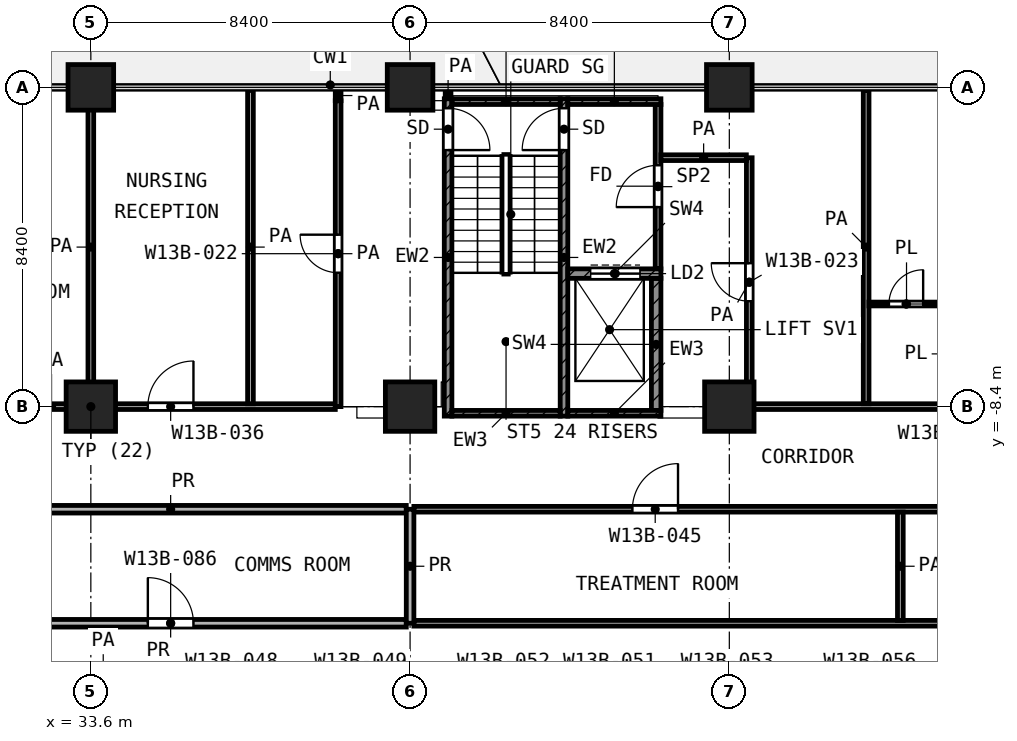
"""IFC4 building model, lengths in metres.
Left out: names, types, materials, properties, quantities, classifications, styles, units other than length and angle.
Written with IfcOpenShell. Run it as: python <this file> out.ifc"""

import sys

from ifc_helpers import new_model, si_unit, direction, frame, frame_2d, origin, origin_2d, place, context, subcontext, project, spatial, rectangle, extrude, element, fill, save


model = new_model("IFC4")
c1 = context("Model", 3, precision=1e-05, world=origin(), true_north=direction((0.0, 1.0)))
c2 = subcontext(c1, "Body", "Model", "MODEL_VIEW")
j1 = project(units=[si_unit("LENGTHUNIT", "METRE"), si_unit("PLANEANGLEUNIT", "RADIAN")], contexts=[c1])
p1 = place(None, origin())
s1 = spatial("IfcSite", under=j1, at=p1, CompositionType="ELEMENT")
p2 = place(p1, origin())
s2 = spatial("IfcBuilding", under=s1, at=p2, CompositionType="ELEMENT")
p3 = place(p2, frame((0.0, 0.0, 89.6)))
s3 = spatial("IfcBuildingStorey", under=s2, at=p3, CompositionType="ELEMENT", Elevation=89.6)
for number, where, z_axis, x_axis in (
    (1, (33.6, 0.0, 0.0), (0.0, 0.0, 1.0), (1.0, 0.0, 0.0)),
    (2, (42.0, 0.0, 0.0), (0.0, 0.0, 1.0), (1.0, 0.0, 0.0)),
    (3, (50.4, 0.0, 0.0), (0.0, 0.0, 1.0), (1.0, 0.0, 0.0)),
):
    element("IfcColumn", number, at=place(p3, frame(where, z_axis=z_axis, x_axis=x_axis)), inside=s3, PredefinedType="COLUMN", context=c2, shape_type="SweptSolid", body=[
        extrude(rectangle(XDim=1.2, YDim=1.2, at=origin_2d()), origin(), (0.0, 0.0, 1.0), 4.2),
    ])
for number, where, z_axis, x_axis in (
    (4, (33.6, -8.4, 0.0), (0.0, 0.0, 1.0), (1.0, 0.0, 0.0)),
    (5, (42.0, -8.4, 0.0), (0.0, 0.0, 1.0), (1.0, 0.0, 0.0)),
    (6, (50.4, -8.4, 0.0), (0.0, 0.0, 1.0), (1.0, 0.0, 0.0)),
):
    element("IfcColumn", number, at=place(p3, frame(where, z_axis=z_axis, x_axis=x_axis)), inside=s3, PredefinedType="COLUMN", context=c2, shape_type="SweptSolid", body=[
        extrude(rectangle(XDim=1.3, YDim=1.3, at=origin_2d()), origin(), (0.0, 0.0, 1.0), 4.2),
    ])
p4 = place(p3, frame((43.0, -8.65, 0.0), z_axis=(0.0, 0.0, 1.0), x_axis=(0.0, 1.0, 0.0)))
e7 = element("IfcWall", 7, at=p4, inside=s3, PredefinedType="SHEAR", context=c2, shape_type="SweptSolid", body=[
    extrude(rectangle(XDim=8.35, YDim=0.2, at=frame_2d((4.175, 0.0))), origin(), (0.0, 0.0, 1.0), 3.7),
])
p5 = place(p4, frame((7.0, 0.0, 0.0)))
e8 = element("IfcOpeningElement", 8, at=p5, cuts=e7, PredefinedType="OPENING", context=c2, shape_type="SweptSolid", body=[
    extrude(rectangle(XDim=1.1, YDim=2.1, at=frame_2d((0.55, 1.05))), frame((0.0, 0.11, 0.0), z_axis=(0.0, -1.0, 0.0), x_axis=(1.0, 0.0, 0.0)), (0.0, 0.0, 1.0), 0.22),
])
p6 = place(p3, frame((46.05, -8.65, 0.0), z_axis=(0.0, 0.0, 1.0), x_axis=(0.0, 1.0, 0.0)))
e9 = element("IfcWall", 9, at=p6, inside=s3, PredefinedType="SHEAR", context=c2, shape_type="SweptSolid", body=[
    extrude(rectangle(XDim=8.35, YDim=0.2, at=frame_2d((4.175, 0.0))), origin(), (0.0, 0.0, 1.0), 3.7),
])
p7 = place(p6, frame((7.0, 0.0, 0.0)))
e10 = element("IfcOpeningElement", 10, at=p7, cuts=e9, PredefinedType="OPENING", context=c2, shape_type="SweptSolid", body=[
    extrude(rectangle(XDim=1.1, YDim=2.1, at=frame_2d((0.55, 1.05))), frame((0.0, 0.11, 0.0), z_axis=(0.0, -1.0, 0.0), x_axis=(1.0, 0.0, 0.0)), (0.0, 0.0, 1.0), 0.22),
])
p8 = place(p3, frame((43.1, -0.375, 0.0), z_axis=(0.0, 0.0, 1.0), x_axis=(1.0, 0.0, 0.0)))
e11 = element("IfcWall", 11, at=p8, inside=s3, PredefinedType="SHEAR", context=c2, shape_type="SweptSolid", body=[
    extrude(rectangle(XDim=2.85, YDim=0.15, at=frame_2d((1.425, 0.0))), origin(), (0.0, 0.0, 1.0), 3.7),
])
p9 = place(p3, frame((46.15, -0.375, 0.0), z_axis=(0.0, 0.0, 1.0), x_axis=(1.0, 0.0, 0.0)))
e12 = element("IfcWall", 12, at=p9, inside=s3, PredefinedType="SHEAR", context=c2, shape_type="SweptSolid", body=[
    extrude(rectangle(XDim=2.45, YDim=0.15, at=frame_2d((1.225, 0.0))), origin(), (0.0, 0.0, 1.0), 3.7),
])
p10 = place(p3, frame((43.1, -8.575, 0.0), z_axis=(0.0, 0.0, 1.0), x_axis=(1.0, 0.0, 0.0)))
e13 = element("IfcWall", 13, at=p10, inside=s3, PredefinedType="SHEAR", context=c2, shape_type="SweptSolid", body=[
    extrude(rectangle(XDim=2.85, YDim=0.15, at=frame_2d((1.425, 0.0))), origin(), (0.0, 0.0, 1.0), 3.7),
])
p11 = place(p3, frame((46.15, -8.575, 0.0), z_axis=(0.0, 0.0, 1.0), x_axis=(1.0, 0.0, 0.0)))
e14 = element("IfcWall", 14, at=p11, inside=s3, PredefinedType="SHEAR", context=c2, shape_type="SweptSolid", body=[
    extrude(rectangle(XDim=2.45, YDim=0.15, at=frame_2d((1.225, 0.0))), origin(), (0.0, 0.0, 1.0), 3.7),
])
p12 = place(p3, frame((46.15, -4.9, 0.0), z_axis=(0.0, 0.0, 1.0), x_axis=(1.0, 0.0, 0.0)))
e15 = element("IfcWall", 15, at=p12, inside=s3, PredefinedType="SHEAR", context=c2, shape_type="SweptSolid", body=[
    extrude(rectangle(XDim=2.45, YDim=0.25, at=frame_2d((1.225, 0.0))), origin(), (0.0, 0.0, 1.0), 3.7),
])
p13 = place(p12, frame((0.6, 0.0, 0.0)))
e16 = element("IfcOpeningElement", 16, at=p13, cuts=e15, PredefinedType="OPENING", context=c2, shape_type="SweptSolid", body=[
    extrude(rectangle(XDim=1.3, YDim=2.1, at=frame_2d((0.65, 1.05))), frame((0.0, 0.135, 0.0), z_axis=(0.0, -1.0, 0.0), x_axis=(1.0, 0.0, 0.0)), (0.0, 0.0, 1.0), 0.27),
])
p14 = place(p3, frame((48.475, -8.5, 0.0), z_axis=(0.0, 0.0, 1.0), x_axis=(0.0, 1.0, 0.0)))
e17 = element("IfcWall", 17, at=p14, inside=s3, PredefinedType="SHEAR", context=c2, shape_type="SweptSolid", body=[
    extrude(rectangle(XDim=3.475, YDim=0.25, at=frame_2d((1.738, 0.0))), origin(), (0.0, 0.0, 1.0), 3.7),
])
p15 = place(p3, frame((48.525, -4.775, 0.0), z_axis=(0.0, 0.0, 1.0), x_axis=(0.0, 1.0, 0.0)))
e18 = element("IfcWall", 18, at=p15, inside=s3, PredefinedType="PARTITIONING", context=c2, shape_type="SweptSolid", body=[
    extrude(rectangle(XDim=4.325, YDim=0.15, at=frame_2d((2.163, 0.0))), origin(), (0.0, 0.0, 1.0), 3.7),
])
p16 = place(p15, frame((1.625, 0.0, 0.0)))
e19 = element("IfcOpeningElement", 19, at=p16, cuts=e18, PredefinedType="OPENING", context=c2, shape_type="SweptSolid", body=[
    extrude(rectangle(XDim=1.1, YDim=2.1, at=frame_2d((0.55, 1.05))), frame((0.0, 0.085, 0.0), z_axis=(0.0, -1.0, 0.0), x_axis=(1.0, 0.0, 0.0)), (0.0, 0.0, 1.0), 0.17),
])
p17 = place(p3, frame((54.075, -5.7, 0.0), z_axis=(0.0, 0.0, 1.0), x_axis=(1.0, 0.0, 0.0)))
e20 = element("IfcWall", 20, at=p17, inside=s3, PredefinedType="PARTITIONING", context=c2, shape_type="SweptSolid", body=[
    extrude(rectangle(XDim=1.975, YDim=0.1, at=frame_2d((0.988, 0.0))), origin(), (0.0, 0.0, 1.0), 3.7),
])
p18 = place(p17, frame((0.525, 0.0, 0.0)))
e21 = element("IfcOpeningElement", 21, at=p18, cuts=e20, PredefinedType="OPENING", context=c2, shape_type="SweptSolid", body=[
    extrude(rectangle(XDim=0.9, YDim=2.1, at=frame_2d((0.45, 1.05))), frame((0.0, 0.06, 0.0), z_axis=(0.0, -1.0, 0.0), x_axis=(1.0, 0.0, 0.0)), (0.0, 0.0, 1.0), 0.12),
])
p19 = place(p3, frame((42.1, -14.1, 0.0), z_axis=(0.0, 0.0, 1.0), x_axis=(1.0, 0.0, 0.0)))
e22 = element("IfcWall", 22, at=p19, inside=s3, PredefinedType="PARTITIONING", context=c2, shape_type="SweptSolid", body=[
    extrude(rectangle(XDim=34.925, YDim=0.15, at=frame_2d((17.462, 0.0))), origin(), (0.0, 0.0, 1.0), 3.7),
])
p20 = place(p19, frame((20.55, 0.0, 0.0)))
e23 = element("IfcOpeningElement", 23, at=p20, cuts=e22, PredefinedType="OPENING", context=c2, shape_type="SweptSolid", body=[
    extrude(rectangle(XDim=1.0, YDim=2.1, at=frame_2d((0.5, 1.05))), frame((0.0, 0.085, 0.0), z_axis=(0.0, -1.0, 0.0), x_axis=(1.0, 0.0, 0.0)), (0.0, 0.0, 1.0), 0.17),
])
p21 = place(p19, frame((31.65, 0.0, 0.0)))
e24 = element("IfcOpeningElement", 24, at=p21, cuts=e22, PredefinedType="OPENING", context=c2, shape_type="SweptSolid", body=[
    extrude(rectangle(XDim=1.0, YDim=2.1, at=frame_2d((0.5, 1.05))), frame((0.0, 0.085, 0.0), z_axis=(0.0, -1.0, 0.0), x_axis=(1.0, 0.0, 0.0)), (0.0, 0.0, 1.0), 0.17),
])
p22 = place(p3, frame((42.1, -11.1, 0.0), z_axis=(0.0, 0.0, 1.0), x_axis=(1.0, 0.0, 0.0)))
e25 = element("IfcWall", 25, at=p22, inside=s3, PredefinedType="PARTITIONING", context=c2, shape_type="SweptSolid", body=[
    extrude(rectangle(XDim=34.925, YDim=0.15, at=frame_2d((17.462, 0.0))), origin(), (0.0, 0.0, 1.0), 3.7),
])
p23 = place(p22, frame((5.75, 0.0, 0.0)))
e26 = element("IfcOpeningElement", 26, at=p23, cuts=e25, PredefinedType="OPENING", context=c2, shape_type="SweptSolid", body=[
    extrude(rectangle(XDim=1.2, YDim=2.1, at=frame_2d((0.6, 1.05))), frame((0.0, 0.085, 0.0), z_axis=(0.0, -1.0, 0.0), x_axis=(1.0, 0.0, 0.0)), (0.0, 0.0, 1.0), 0.17),
])
p24 = place(p3, frame((25.1, -8.4, 0.0), z_axis=(0.0, 0.0, 1.0), x_axis=(1.0, 0.0, 0.0)))
e27 = element("IfcWall", 27, at=p24, inside=s3, PredefinedType="PARTITIONING", context=c2, shape_type="SweptSolid", body=[
    extrude(rectangle(XDim=14.932, YDim=0.15, at=frame_2d((7.466, 0.0))), origin(), (0.0, 0.0, 1.0), 3.7),
])
p25 = place(p24, frame((10.0, 0.0, 0.0)))
e28 = element("IfcOpeningElement", 28, at=p25, cuts=e27, PredefinedType="OPENING", context=c2, shape_type="SweptSolid", body=[
    extrude(rectangle(XDim=1.2, YDim=2.1, at=frame_2d((0.6, 1.05))), frame((0.0, 0.085, 0.0), z_axis=(0.0, -1.0, 0.0), x_axis=(1.0, 0.0, 0.0)), (0.0, 0.0, 1.0), 0.17),
])
p26 = place(p24, frame((0.65, 0.0, 0.0)))
e29 = element("IfcOpeningElement", 29, at=p26, cuts=e27, PredefinedType="OPENING", context=c2, shape_type="SweptSolid", body=[
    extrude(rectangle(XDim=1.0, YDim=2.1, at=frame_2d((0.5, 1.05))), frame((0.0, 0.085, 0.0), z_axis=(0.0, -1.0, 0.0), x_axis=(1.0, 0.0, 0.0)), (0.0, 0.0, 1.0), 0.17),
])
p27 = place(p24, frame((4.85, 0.0, 0.0)))
e30 = element("IfcOpeningElement", 30, at=p27, cuts=e27, PredefinedType="OPENING", context=c2, shape_type="SweptSolid", body=[
    extrude(rectangle(XDim=1.0, YDim=2.1, at=frame_2d((0.5, 1.05))), frame((0.0, 0.085, 0.0), z_axis=(0.0, -1.0, 0.0), x_axis=(1.0, 0.0, 0.0)), (0.0, 0.0, 1.0), 0.17),
])
p28 = place(p3, frame((51.0, -8.4, 0.0), z_axis=(0.0, 0.0, 1.0), x_axis=(1.0, 0.0, 0.0)))
e31 = element("IfcWall", 31, at=p28, inside=s3, PredefinedType="PARTITIONING", context=c2, shape_type="SweptSolid", body=[
    extrude(rectangle(XDim=28.72, YDim=0.15, at=frame_2d((14.36, 0.0))), origin(), (0.0, 0.0, 1.0), 3.7),
])
p29 = place(p28, frame((5.7, 0.0, 0.0)))
e32 = element("IfcOpeningElement", 32, at=p29, cuts=e31, PredefinedType="OPENING", context=c2, shape_type="SweptSolid", body=[
    extrude(rectangle(XDim=1.2, YDim=2.1, at=frame_2d((0.6, 1.05))), frame((0.0, 0.085, 0.0), z_axis=(0.0, -1.0, 0.0), x_axis=(1.0, 0.0, 0.0)), (0.0, 0.0, 1.0), 0.17),
])
p30 = place(p28, frame((8.5, 0.0, 0.0)))
e33 = element("IfcOpeningElement", 33, at=p30, cuts=e31, PredefinedType="OPENING", context=c2, shape_type="SweptSolid", body=[
    extrude(rectangle(XDim=1.2, YDim=2.1, at=frame_2d((0.6, 1.05))), frame((0.0, 0.085, 0.0), z_axis=(0.0, -1.0, 0.0), x_axis=(1.0, 0.0, 0.0)), (0.0, 0.0, 1.0), 0.17),
])
p31 = place(p28, frame((10.35, 0.0, 0.0)))
e34 = element("IfcOpeningElement", 34, at=p31, cuts=e31, PredefinedType="OPENING", context=c2, shape_type="SweptSolid", body=[
    extrude(rectangle(XDim=1.2, YDim=2.1, at=frame_2d((0.6, 1.05))), frame((0.0, 0.085, 0.0), z_axis=(0.0, -1.0, 0.0), x_axis=(1.0, 0.0, 0.0)), (0.0, 0.0, 1.0), 0.17),
])
p32 = place(p28, frame((14.3, 0.0, 0.0)))
e35 = element("IfcOpeningElement", 35, at=p32, cuts=e31, PredefinedType="OPENING", context=c2, shape_type="SweptSolid", body=[
    extrude(rectangle(XDim=1.2, YDim=2.1, at=frame_2d((0.6, 1.05))), frame((0.0, 0.085, 0.0), z_axis=(0.0, -1.0, 0.0), x_axis=(1.0, 0.0, 0.0)), (0.0, 0.0, 1.0), 0.17),
])
p33 = place(p28, frame((16.9, 0.0, 0.0)))
e36 = element("IfcOpeningElement", 36, at=p33, cuts=e31, PredefinedType="OPENING", context=c2, shape_type="SweptSolid", body=[
    extrude(rectangle(XDim=1.2, YDim=2.1, at=frame_2d((0.6, 1.05))), frame((0.0, 0.085, 0.0), z_axis=(0.0, -1.0, 0.0), x_axis=(1.0, 0.0, 0.0)), (0.0, 0.0, 1.0), 0.17),
])
p34 = place(p28, frame((19.35, 0.0, 0.0)))
e37 = element("IfcOpeningElement", 37, at=p34, cuts=e31, PredefinedType="OPENING", context=c2, shape_type="SweptSolid", body=[
    extrude(rectangle(XDim=1.2, YDim=2.1, at=frame_2d((0.6, 1.05))), frame((0.0, 0.085, 0.0), z_axis=(0.0, -1.0, 0.0), x_axis=(1.0, 0.0, 0.0)), (0.0, 0.0, 1.0), 0.17),
])
p35 = place(p28, frame((25.35, 0.0, 0.0)))
e38 = element("IfcOpeningElement", 38, at=p35, cuts=e31, PredefinedType="OPENING", context=c2, shape_type="SweptSolid", body=[
    extrude(rectangle(XDim=1.5, YDim=2.1, at=frame_2d((0.75, 1.05))), frame((0.0, 0.085, 0.0), z_axis=(0.0, -1.0, 0.0), x_axis=(1.0, 0.0, 0.0)), (0.0, 0.0, 1.0), 0.17),
])
p36 = place(p3, frame((48.6, -1.85, 0.0), z_axis=(0.0, 0.0, 1.0), x_axis=(1.0, 0.0, 0.0)))
e39 = element("IfcWall", 39, at=p36, inside=s3, PredefinedType="PARTITIONING", context=c2, shape_type="SweptSolid", body=[
    extrude(rectangle(XDim=2.248, YDim=0.15, at=frame_2d((1.124, 0.0))), origin(), (0.0, 0.0, 1.0), 3.7),
])
for number, where, z_axis, x_axis in (
    (40, (33.6, -8.325, 0.0), (0.0, 0.0, 1.0), (0.0, 1.0, 0.0)),
    (41, (37.8, -8.325, 0.0), (0.0, 0.0, 1.0), (0.0, 1.0, 0.0)),
):
    element("IfcWall", number, at=place(p3, frame(where, z_axis=z_axis, x_axis=x_axis)), inside=s3, PredefinedType="PARTITIONING", context=c2, shape_type="SweptSolid", body=[
        extrude(rectangle(XDim=8.245, YDim=0.15, at=frame_2d((4.123, 0.0))), origin(), (0.0, 0.0, 1.0), 3.7),
    ])
p37 = place(p3, frame((40.107, -8.4, 0.0), z_axis=(0.0, 0.0, 1.0), x_axis=(0.0, 1.0, 0.0)))
e42 = element("IfcWall", 42, at=p37, inside=s3, PredefinedType="PARTITIONING", context=c2, shape_type="SweptSolid", body=[
    extrude(rectangle(XDim=8.048, YDim=0.15, at=frame_2d((4.024, 0.0))), origin(), (0.0, 0.0, 1.0), 3.7),
])
p38 = place(p37, frame((3.524, 0.0, 0.0)))
e43 = element("IfcOpeningElement", 43, at=p38, cuts=e42, PredefinedType="OPENING", context=c2, shape_type="SweptSolid", body=[
    extrude(rectangle(XDim=1.0, YDim=2.1, at=frame_2d((0.5, 1.05))), frame((0.0, 0.085, 0.0), z_axis=(0.0, -1.0, 0.0), x_axis=(1.0, 0.0, 0.0)), (0.0, 0.0, 1.0), 0.17),
])
p39 = place(p3, frame((40.107, -0.35, 0.0), z_axis=(0.0, 0.0, 1.0), x_axis=(0.0, 1.0, 0.0)))
e44 = element("IfcWall", 44, at=p39, inside=s3, PredefinedType="PARTITIONING", context=c2, shape_type="SweptSolid", body=[
    extrude(rectangle(XDim=0.27, YDim=0.15, at=frame_2d((0.135, 0.0))), origin(), (0.0, 0.0, 1.0), 3.7),
])
p40 = place(p3, frame((43.0, -0.27, 0.0), z_axis=(0.0, 0.0, 1.0), x_axis=(0.0, 1.0, 0.0)))
e45 = element("IfcWall", 45, at=p40, inside=s3, PredefinedType="PARTITIONING", context=c2, shape_type="SweptSolid", body=[
    extrude(rectangle(XDim=0.19, YDim=0.15, at=frame_2d((0.095, 0.0))), origin(), (0.0, 0.0, 1.0), 3.7),
])
p41 = place(p3, frame((50.925, -8.4, 0.0), z_axis=(0.0, 0.0, 1.0), x_axis=(0.0, 1.0, 0.0)))
e46 = element("IfcWall", 46, at=p41, inside=s3, PredefinedType="PARTITIONING", context=c2, shape_type="SweptSolid", body=[
    extrude(rectangle(XDim=6.548, YDim=0.15, at=frame_2d((3.274, 0.0))), origin(), (0.0, 0.0, 1.0), 3.7),
])
p42 = place(p41, frame((2.774, 0.0, 0.0)))
e47 = element("IfcOpeningElement", 47, at=p42, cuts=e46, PredefinedType="OPENING", context=c2, shape_type="SweptSolid", body=[
    extrude(rectangle(XDim=1.0, YDim=2.1, at=frame_2d((0.5, 1.05))), frame((0.0, 0.085, 0.0), z_axis=(0.0, -1.0, 0.0), x_axis=(1.0, 0.0, 0.0)), (0.0, 0.0, 1.0), 0.17),
])
p43 = place(p3, frame((54.0, -8.325, 0.0), z_axis=(0.0, 0.0, 1.0), x_axis=(0.0, 1.0, 0.0)))
e48 = element("IfcWall", 48, at=p43, inside=s3, PredefinedType="PARTITIONING", context=c2, shape_type="SweptSolid", body=[
    extrude(rectangle(XDim=8.245, YDim=0.15, at=frame_2d((4.123, 0.0))), origin(), (0.0, 0.0, 1.0), 3.7),
])
p44 = place(p3, frame((54.9, -14.025, 0.0), z_axis=(0.0, 0.0, 1.0), x_axis=(0.0, 1.0, 0.0)))
e49 = element("IfcWall", 49, at=p44, inside=s3, PredefinedType="PARTITIONING", context=c2, shape_type="SweptSolid", body=[
    extrude(rectangle(XDim=2.85, YDim=0.15, at=frame_2d((1.425, 0.0))), origin(), (0.0, 0.0, 1.0), 3.7),
])
p45 = place(p3, frame((29.5, -14.1, 0.0), z_axis=(0.0, 0.0, 1.0), x_axis=(1.0, 0.0, 0.0)))
e50 = element("IfcWall", 50, at=p45, inside=s3, PredefinedType="PARTITIONING", context=c2, shape_type="SweptSolid", body=[
    extrude(rectangle(XDim=12.4, YDim=0.2, at=frame_2d((6.2, 0.0))), origin(), (0.0, 0.0, 1.0), 3.7),
])
p46 = place(p45, frame((5.6, 0.0, 0.0)))
e51 = element("IfcOpeningElement", 51, at=p46, cuts=e50, PredefinedType="OPENING", context=c2, shape_type="SweptSolid", body=[
    extrude(rectangle(XDim=1.2, YDim=2.1, at=frame_2d((0.6, 1.05))), frame((0.0, 0.11, 0.0), z_axis=(0.0, -1.0, 0.0), x_axis=(1.0, 0.0, 0.0)), (0.0, 0.0, 1.0), 0.22),
])
p47 = place(p3, frame((29.5, -11.1, 0.0), z_axis=(0.0, 0.0, 1.0), x_axis=(1.0, 0.0, 0.0)))
e52 = element("IfcWall", 52, at=p47, inside=s3, PredefinedType="PARTITIONING", context=c2, shape_type="SweptSolid", body=[
    extrude(rectangle(XDim=12.4, YDim=0.2, at=frame_2d((6.2, 0.0))), origin(), (0.0, 0.0, 1.0), 3.7),
])
p48 = place(p3, frame((42.0, -14.1, 0.0), z_axis=(0.0, 0.0, 1.0), x_axis=(0.0, 1.0, 0.0)))
e53 = element("IfcWall", 53, at=p48, inside=s3, PredefinedType="PARTITIONING", context=c2, shape_type="SweptSolid", body=[
    extrude(rectangle(XDim=3.0, YDim=0.2, at=frame_2d((1.5, 0.0))), origin(), (0.0, 0.0, 1.0), 3.7),
])
p49 = place(p5, frame((1.1, 0.0, 0.0), z_axis=(0.0, 0.0, 1.0), x_axis=(-1.0, 0.0, 0.0)))
e54 = element("IfcDoor", 54, at=p49, inside=s3, OperationType="SINGLE_SWING_LEFT", PredefinedType="DOOR", context=c2, shape_type="SweptSolid", body=[
    extrude(rectangle(XDim=1.1, YDim=2.1, at=frame_2d((0.55, 1.05))), frame((0.0, 0.025, 0.0), z_axis=(0.0, -1.0, 0.0), x_axis=(1.0, 0.0, 0.0)), (0.0, 0.0, 1.0), 0.05),
])
fill(e8, e54)
p50 = place(p7, origin())
e55 = element("IfcDoor", 55, at=p50, inside=s3, OperationType="SINGLE_SWING_LEFT", PredefinedType="DOOR", context=c2, shape_type="SweptSolid", body=[
    extrude(rectangle(XDim=1.1, YDim=2.1, at=frame_2d((0.55, 1.05))), frame((0.0, 0.025, 0.0), z_axis=(0.0, -1.0, 0.0), x_axis=(1.0, 0.0, 0.0)), (0.0, 0.0, 1.0), 0.05),
])
fill(e10, e55)
p51 = place(p13, origin())
e56 = element("IfcDoor", 56, at=p51, inside=s3, OperationType="DOUBLE_DOOR_SLIDING", PredefinedType="DOOR", context=c2, shape_type="SweptSolid", body=[
    extrude(rectangle(XDim=1.3, YDim=2.1, at=frame_2d((0.65, 1.05))), frame((0.0, 0.025, 0.0), z_axis=(0.0, -1.0, 0.0), x_axis=(1.0, 0.0, 0.0)), (0.0, 0.0, 1.0), 0.05),
])
fill(e16, e56)
p52 = place(p16, origin())
e57 = element("IfcDoor", 57, at=p52, inside=s3, OperationType="SINGLE_SWING_LEFT", PredefinedType="DOOR", context=c2, shape_type="SweptSolid", body=[
    extrude(rectangle(XDim=1.1, YDim=2.1, at=frame_2d((0.55, 1.05))), frame((0.0, 0.025, 0.0), z_axis=(0.0, -1.0, 0.0), x_axis=(1.0, 0.0, 0.0)), (0.0, 0.0, 1.0), 0.05),
])
fill(e19, e57)
p53 = place(p25, origin())
e58 = element("IfcDoor", 58, at=p53, inside=s3, OperationType="SINGLE_SWING_RIGHT", PredefinedType="DOOR", context=c2, shape_type="SweptSolid", body=[
    extrude(rectangle(XDim=1.2, YDim=2.1, at=frame_2d((0.6, 1.05))), frame((0.0, 0.025, 0.0), z_axis=(0.0, -1.0, 0.0), x_axis=(1.0, 0.0, 0.0)), (0.0, 0.0, 1.0), 0.05),
])
fill(e28, e58)
p54 = place(p38, origin())
e59 = element("IfcDoor", 59, at=p54, inside=s3, OperationType="SINGLE_SWING_RIGHT", PredefinedType="DOOR", context=c2, shape_type="SweptSolid", body=[
    extrude(rectangle(XDim=1.0, YDim=2.1, at=frame_2d((0.5, 1.05))), frame((0.0, 0.025, 0.0), z_axis=(0.0, -1.0, 0.0), x_axis=(1.0, 0.0, 0.0)), (0.0, 0.0, 1.0), 0.05),
])
fill(e43, e59)
p55 = place(p42, origin())
e60 = element("IfcDoor", 60, at=p55, inside=s3, OperationType="SINGLE_SWING_RIGHT", PredefinedType="DOOR", context=c2, shape_type="SweptSolid", body=[
    extrude(rectangle(XDim=1.0, YDim=2.1, at=frame_2d((0.5, 1.05))), frame((0.0, 0.025, 0.0), z_axis=(0.0, -1.0, 0.0), x_axis=(1.0, 0.0, 0.0)), (0.0, 0.0, 1.0), 0.05),
])
fill(e47, e60)
p56 = place(p18, origin())
e61 = element("IfcDoor", 61, at=p56, inside=s3, OperationType="SINGLE_SWING_RIGHT", PredefinedType="DOOR", context=c2, shape_type="SweptSolid", body=[
    extrude(rectangle(XDim=0.9, YDim=2.1, at=frame_2d((0.45, 1.05))), frame((0.0, 0.025, 0.0), z_axis=(0.0, -1.0, 0.0), x_axis=(1.0, 0.0, 0.0)), (0.0, 0.0, 1.0), 0.05),
])
fill(e21, e61)
p57 = place(p46, origin())
e62 = element("IfcDoor", 62, at=p57, inside=s3, OperationType="SINGLE_SWING_LEFT", PredefinedType="DOOR", context=c2, shape_type="SweptSolid", body=[
    extrude(rectangle(XDim=1.2, YDim=2.1, at=frame_2d((0.6, 1.05))), frame((0.0, 0.025, 0.0), z_axis=(0.0, -1.0, 0.0), x_axis=(1.0, 0.0, 0.0)), (0.0, 0.0, 1.0), 0.05),
])
fill(e51, e62)
p58 = place(p23, origin())
e63 = element("IfcDoor", 63, at=p58, inside=s3, OperationType="SINGLE_SWING_RIGHT", PredefinedType="DOOR", context=c2, shape_type="SweptSolid", body=[
    extrude(rectangle(XDim=1.2, YDim=2.1, at=frame_2d((0.6, 1.05))), frame((0.0, 0.025, 0.0), z_axis=(0.0, -1.0, 0.0), x_axis=(1.0, 0.0, 0.0)), (0.0, 0.0, 1.0), 0.05),
])
fill(e26, e63)
save(model, sys.argv[1])
